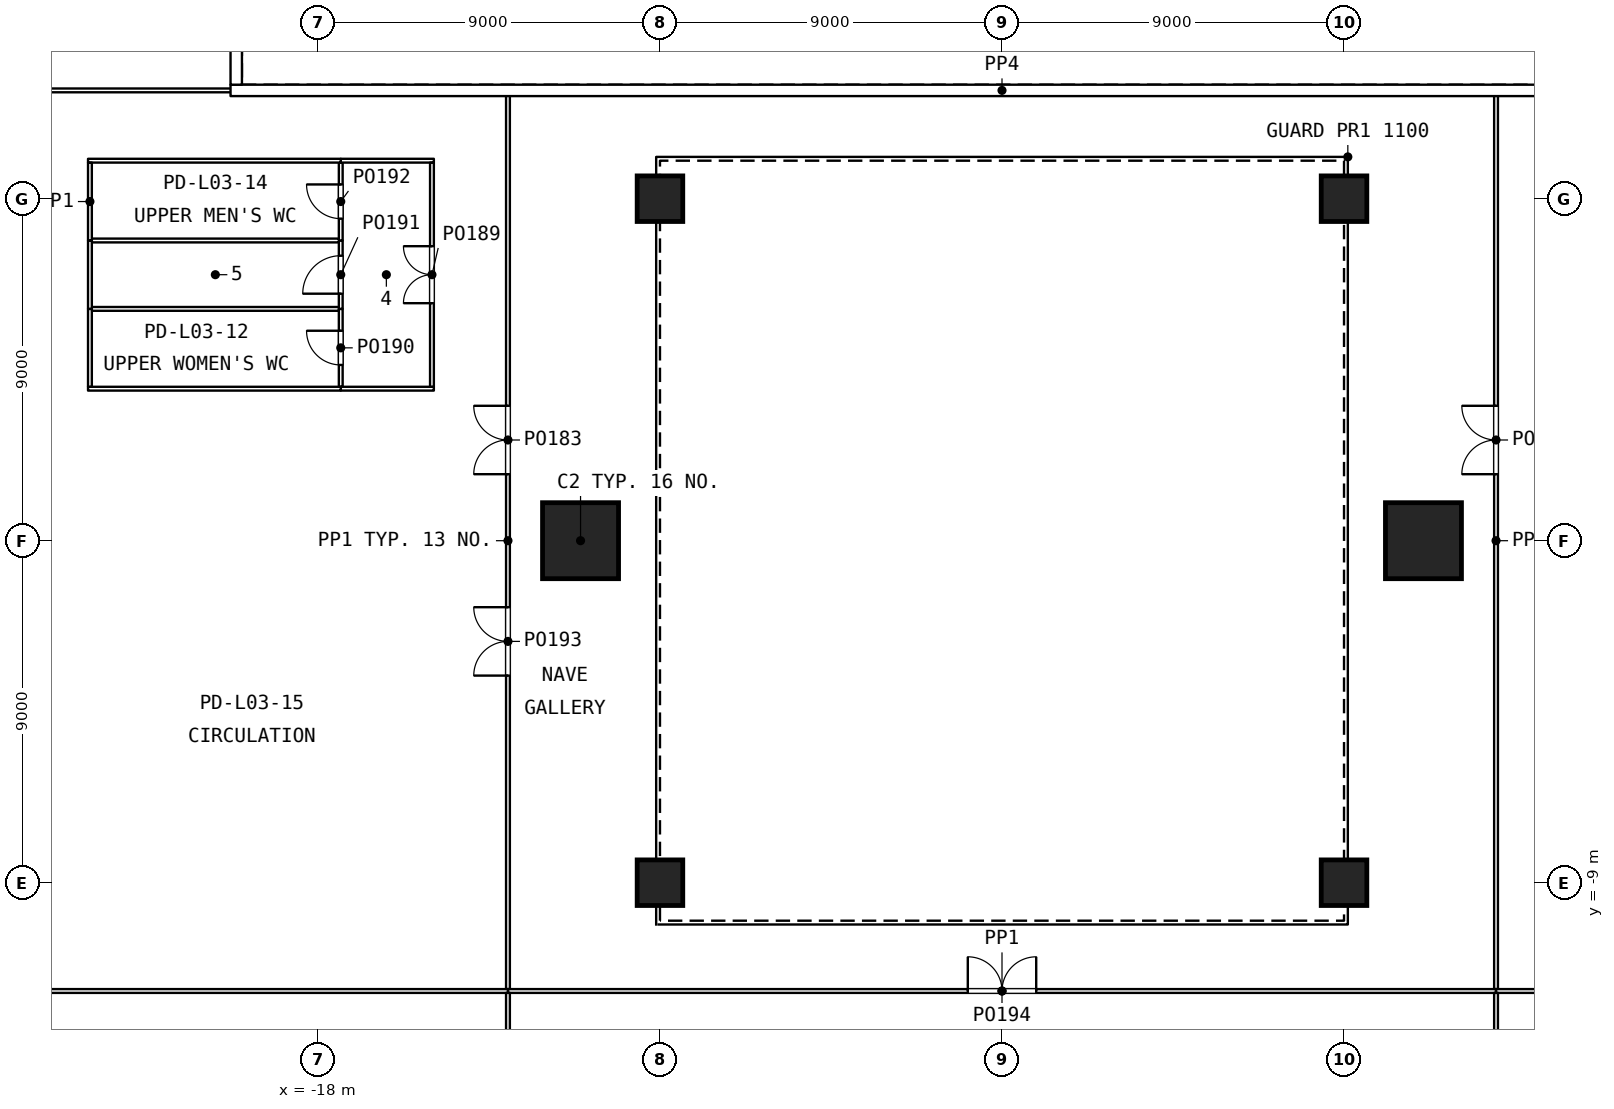
"""IFC4 building model, lengths in metres.
Left out: names, types, materials, properties, quantities, classifications, styles, units other than length and angle.
Written with IfcOpenShell. Run it as: python <this file> out.ifc"""

import sys

from ifc_helpers import new_model, si_unit, direction, frame, frame_2d, origin, origin_2d, place, context, subcontext, project, spatial, rectangle, extrude, element, fill, save


model = new_model("IFC4")
c1 = context("Model", 3, precision=1e-05, world=origin(), true_north=direction((0.0, 1.0)))
c2 = subcontext(c1, "Body", "Model", "MODEL_VIEW")
j1 = project(units=[si_unit("LENGTHUNIT", "METRE"), si_unit("PLANEANGLEUNIT", "RADIAN")], contexts=[c1])
p1 = place(None, origin())
s1 = spatial("IfcSite", under=j1, at=p1, CompositionType="ELEMENT")
p2 = place(p1, origin())
s2 = spatial("IfcBuilding", under=s1, at=p2, CompositionType="ELEMENT")
p3 = place(p2, frame((0.0, 0.0, 18.0)))
s3 = spatial("IfcBuildingStorey", under=s2, at=p3, CompositionType="ELEMENT", Elevation=18.0)
for number, where, z_axis, x_axis in (
    (1, (-9.0, -9.0, 0.0), (0.0, 0.0, 1.0), (1.0, 0.0, 0.0)),
    (2, (-9.0, 9.0, 0.0), (0.0, 0.0, 1.0), (1.0, 0.0, 0.0)),
    (3, (9.0, -9.0, 0.0), (0.0, 0.0, 1.0), (1.0, 0.0, 0.0)),
    (4, (9.0, 9.0, 0.0), (0.0, 0.0, 1.0), (1.0, 0.0, 0.0)),
):
    element("IfcColumn", number, at=place(p3, frame(where, z_axis=z_axis, x_axis=x_axis)), inside=s3, PredefinedType="COLUMN", context=c2, shape_type="SweptSolid", body=[
        extrude(rectangle(XDim=1.2, YDim=1.2, at=origin_2d()), origin(), (0.0, 0.0, 1.0), 4.8),
    ])
for number, where, z_axis, x_axis in (
    (5, (-11.09, 0.0, 0.0), (0.0, 0.0, 1.0), (1.0, 0.0, 0.0)),
    (6, (11.09, 0.0, 0.0), (0.0, 0.0, 1.0), (-1.0, 0.0, 0.0)),
):
    element("IfcColumn", number, at=place(p3, frame(where, z_axis=z_axis, x_axis=x_axis)), inside=s3, PredefinedType="COLUMN", context=c2, shape_type="SweptSolid", body=[
        extrude(rectangle(XDim=2.0, YDim=2.0, at=origin_2d()), origin(), (0.0, 0.0, 1.0), 4.8),
    ])
p4 = place(p3, frame((-56.2, 11.85, 0.0), z_axis=(0.0, 0.0, 1.0), x_axis=(1.0, 0.0, 0.0)))
e7 = element("IfcWall", 7, at=p4, inside=s3, PredefinedType="PARTITIONING", context=c2, shape_type="SweptSolid", body=[
    extrude(rectangle(XDim=36.1, YDim=0.1, at=frame_2d((18.05, 0.0))), origin(), (0.0, 0.0, 1.0), 4.5),
])
p5 = place(p4, frame((17.15, 0.0, 0.0)))
e8 = element("IfcOpeningElement", 8, at=p5, cuts=e7, PredefinedType="OPENING", context=c2, shape_type="SweptSolid", body=[
    extrude(rectangle(XDim=1.8, YDim=2.1, at=frame_2d((0.9, 1.05))), frame((0.0, 0.06, 0.0), z_axis=(0.0, -1.0, 0.0), x_axis=(1.0, 0.0, 0.0)), (0.0, 0.0, 1.0), 0.12),
])
p6 = place(p3, frame((-13.0, -11.8, 0.0), z_axis=(0.0, 0.0, 1.0), x_axis=(0.0, 1.0, 0.0)))
e9 = element("IfcWall", 9, at=p6, inside=s3, PredefinedType="PARTITIONING", context=c2, shape_type="SweptSolid", body=[
    extrude(rectangle(XDim=23.6, YDim=0.1, at=frame_2d((11.8, 0.0))), origin(), (0.0, 0.0, 1.0), 4.5),
])
p7 = place(p6, frame((13.55, 0.0, 0.0)))
e10 = element("IfcOpeningElement", 10, at=p7, cuts=e9, PredefinedType="OPENING", context=c2, shape_type="SweptSolid", body=[
    extrude(rectangle(XDim=1.8, YDim=2.1, at=frame_2d((0.9, 1.05))), frame((0.0, 0.06, 0.0), z_axis=(0.0, -1.0, 0.0), x_axis=(1.0, 0.0, 0.0)), (0.0, 0.0, 1.0), 0.12),
])
p8 = place(p6, frame((8.25, 0.0, 0.0)))
e11 = element("IfcOpeningElement", 11, at=p8, cuts=e9, PredefinedType="OPENING", context=c2, shape_type="SweptSolid", body=[
    extrude(rectangle(XDim=1.8, YDim=2.1, at=frame_2d((0.9, 1.05))), frame((0.0, 0.06, 0.0), z_axis=(0.0, -1.0, 0.0), x_axis=(1.0, 0.0, 0.0)), (0.0, 0.0, 1.0), 0.12),
])
p9 = place(p3, frame((13.0, -11.8, 0.0), z_axis=(0.0, 0.0, 1.0), x_axis=(0.0, 1.0, 0.0)))
e12 = element("IfcWall", 12, at=p9, inside=s3, PredefinedType="PARTITIONING", context=c2, shape_type="SweptSolid", body=[
    extrude(rectangle(XDim=23.6, YDim=0.1, at=frame_2d((11.8, 0.0))), origin(), (0.0, 0.0, 1.0), 4.5),
])
p10 = place(p9, frame((13.55, 0.0, 0.0)))
e13 = element("IfcOpeningElement", 13, at=p10, cuts=e12, PredefinedType="OPENING", context=c2, shape_type="SweptSolid", body=[
    extrude(rectangle(XDim=1.8, YDim=2.1, at=frame_2d((0.9, 1.05))), frame((0.0, 0.06, 0.0), z_axis=(0.0, -1.0, 0.0), x_axis=(1.0, 0.0, 0.0)), (0.0, 0.0, 1.0), 0.12),
])
p11 = place(p3, frame((-13.0, -11.85, 0.0), z_axis=(0.0, 0.0, 1.0), x_axis=(1.0, 0.0, 0.0)))
e14 = element("IfcWall", 14, at=p11, inside=s3, PredefinedType="PARTITIONING", context=c2, shape_type="SweptSolid", body=[
    extrude(rectangle(XDim=26.0, YDim=0.1, at=frame_2d((13.0, 0.0))), origin(), (0.0, 0.0, 1.0), 4.5),
])
p12 = place(p11, frame((12.1, 0.0, 0.0)))
e15 = element("IfcOpeningElement", 15, at=p12, cuts=e14, PredefinedType="OPENING", context=c2, shape_type="SweptSolid", body=[
    extrude(rectangle(XDim=1.8, YDim=2.1, at=frame_2d((0.9, 1.05))), frame((0.0, 0.06, 0.0), z_axis=(0.0, -1.0, 0.0), x_axis=(1.0, 0.0, 0.0)), (0.0, 0.0, 1.0), 0.12),
])
p13 = place(p3, frame((-64.6, -11.85, 0.0), z_axis=(0.0, 0.0, 1.0), x_axis=(1.0, 0.0, 0.0)))
e16 = element("IfcWall", 16, at=p13, inside=s3, PredefinedType="PARTITIONING", context=c2, shape_type="SweptSolid", body=[
    extrude(rectangle(XDim=51.6, YDim=0.1, at=frame_2d((25.8, 0.0))), origin(), (0.0, 0.0, 1.0), 4.5),
])
p14 = place(p13, frame((25.3, 0.0, 0.0)))
e17 = element("IfcOpeningElement", 17, at=p14, cuts=e16, PredefinedType="OPENING", context=c2, shape_type="SweptSolid", body=[
    extrude(rectangle(XDim=1.0, YDim=2.1, at=frame_2d((0.5, 1.05))), frame((0.0, 0.06, 0.0), z_axis=(0.0, -1.0, 0.0), x_axis=(1.0, 0.0, 0.0)), (0.0, 0.0, 1.0), 0.12),
])
p15 = place(p3, frame((-13.0, -28.1, 0.0), z_axis=(0.0, 0.0, 1.0), x_axis=(0.0, 1.0, 0.0)))
e18 = element("IfcWall", 18, at=p15, inside=s3, PredefinedType="PARTITIONING", context=c2, shape_type="SweptSolid", body=[
    extrude(rectangle(XDim=16.2, YDim=0.1, at=frame_2d((8.1, 0.0))), origin(), (0.0, 0.0, 1.0), 4.5),
])
p16 = place(p3, frame((13.0, -11.85, 0.0), z_axis=(0.0, 0.0, 1.0), x_axis=(1.0, 0.0, 0.0)))
e19 = element("IfcWall", 19, at=p16, inside=s3, PredefinedType="PARTITIONING", context=c2, shape_type="SweptSolid", body=[
    extrude(rectangle(XDim=21.415, YDim=0.1, at=frame_2d((10.708, 0.0))), origin(), (0.0, 0.0, 1.0), 4.5),
])
p17 = place(p3, frame((13.0, -28.1, 0.0), z_axis=(0.0, 0.0, 1.0), x_axis=(0.0, 1.0, 0.0)))
e20 = element("IfcWall", 20, at=p17, inside=s3, PredefinedType="PARTITIONING", context=c2, shape_type="SweptSolid", body=[
    extrude(rectangle(XDim=16.2, YDim=0.1, at=frame_2d((8.1, 0.0))), origin(), (0.0, 0.0, 1.0), 4.5),
])
p18 = place(p3, frame((-17.4, 4.05, 0.0), z_axis=(0.0, 0.0, 1.0), x_axis=(0.0, 1.0, 0.0)))
e21 = element("IfcWall", 21, at=p18, inside=s3, PredefinedType="PARTITIONING", context=c2, shape_type="SweptSolid", body=[
    extrude(rectangle(XDim=2.05, YDim=0.1, at=frame_2d((1.025, 0.0))), origin(), (0.0, 0.0, 1.0), 4.5),
])
p19 = place(p18, frame((0.575, 0.0, 0.0)))
e22 = element("IfcOpeningElement", 22, at=p19, cuts=e21, PredefinedType="OPENING", context=c2, shape_type="SweptSolid", body=[
    extrude(rectangle(XDim=0.9, YDim=2.1, at=frame_2d((0.45, 1.05))), frame((0.0, 0.06, 0.0), z_axis=(0.0, -1.0, 0.0), x_axis=(1.0, 0.0, 0.0)), (0.0, 0.0, 1.0), 0.12),
])
p20 = place(p3, frame((-17.4, 6.1, 0.0), z_axis=(0.0, 0.0, 1.0), x_axis=(0.0, 1.0, 0.0)))
e23 = element("IfcWall", 23, at=p20, inside=s3, PredefinedType="PARTITIONING", context=c2, shape_type="SweptSolid", body=[
    extrude(rectangle(XDim=1.8, YDim=0.1, at=frame_2d((0.9, 0.0))), origin(), (0.0, 0.0, 1.0), 4.5),
])
p21 = place(p20, frame((0.4, 0.0, 0.0)))
e24 = element("IfcOpeningElement", 24, at=p21, cuts=e23, PredefinedType="OPENING", context=c2, shape_type="SweptSolid", body=[
    extrude(rectangle(XDim=1.0, YDim=2.1, at=frame_2d((0.5, 1.05))), frame((0.0, 0.06, 0.0), z_axis=(0.0, -1.0, 0.0), x_axis=(1.0, 0.0, 0.0)), (0.0, 0.0, 1.0), 0.12),
])
p22 = place(p3, frame((-17.4, 7.9, 0.0), z_axis=(0.0, 0.0, 1.0), x_axis=(0.0, 1.0, 0.0)))
e25 = element("IfcWall", 25, at=p22, inside=s3, PredefinedType="PARTITIONING", context=c2, shape_type="SweptSolid", body=[
    extrude(rectangle(XDim=2.05, YDim=0.1, at=frame_2d((1.025, 0.0))), origin(), (0.0, 0.0, 1.0), 4.5),
])
p23 = place(p22, frame((0.575, 0.0, 0.0)))
e26 = element("IfcOpeningElement", 26, at=p23, cuts=e25, PredefinedType="OPENING", context=c2, shape_type="SweptSolid", body=[
    extrude(rectangle(XDim=0.9, YDim=2.1, at=frame_2d((0.45, 1.05))), frame((0.0, 0.06, 0.0), z_axis=(0.0, -1.0, 0.0), x_axis=(1.0, 0.0, 0.0)), (0.0, 0.0, 1.0), 0.12),
])
for number, where, z_axis, x_axis in (
    (27, (-17.4, 4.0, 0.0), (0.0, 0.0, 1.0), (1.0, 0.0, 0.0)),
    (28, (-17.4, 10.0, 0.0), (0.0, 0.0, 1.0), (1.0, 0.0, 0.0)),
):
    element("IfcWall", number, at=place(p3, frame(where, z_axis=z_axis, x_axis=x_axis)), inside=s3, PredefinedType="PARTITIONING", context=c2, shape_type="SweptSolid", body=[
        extrude(rectangle(XDim=2.45, YDim=0.1, at=frame_2d((1.225, 0.0))), origin(), (0.0, 0.0, 1.0), 4.5),
    ])
p24 = place(p3, frame((-15.0, 4.05, 0.0), z_axis=(0.0, 0.0, 1.0), x_axis=(0.0, 1.0, 0.0)))
e29 = element("IfcWall", 29, at=p24, inside=s3, PredefinedType="PARTITIONING", context=c2, shape_type="SweptSolid", body=[
    extrude(rectangle(XDim=5.9, YDim=0.1, at=frame_2d((2.95, 0.0))), origin(), (0.0, 0.0, 1.0), 4.5),
])
p25 = place(p24, frame((2.2, 0.0, 0.0)))
e30 = element("IfcOpeningElement", 30, at=p25, cuts=e29, PredefinedType="OPENING", context=c2, shape_type="SweptSolid", body=[
    extrude(rectangle(XDim=1.5, YDim=2.1, at=frame_2d((0.75, 1.05))), frame((0.0, 0.06, 0.0), z_axis=(0.0, -1.0, 0.0), x_axis=(1.0, 0.0, 0.0)), (0.0, 0.0, 1.0), 0.12),
])
p26 = place(p3, frame((-23.95, 6.1, 0.0), z_axis=(0.0, 0.0, 1.0), x_axis=(1.0, 0.0, 0.0)))
e31 = element("IfcWall", 31, at=p26, inside=s3, PredefinedType="PARTITIONING", context=c2, shape_type="SweptSolid", body=[
    extrude(rectangle(XDim=6.5, YDim=0.1, at=frame_2d((3.25, 0.0))), origin(), (0.0, 0.0, 1.0), 4.5),
])
p27 = place(p3, frame((-24.05, 4.0, 0.0), z_axis=(0.0, 0.0, 1.0), x_axis=(1.0, 0.0, 0.0)))
e32 = element("IfcWall", 32, at=p27, inside=s3, PredefinedType="PARTITIONING", context=c2, shape_type="SweptSolid", body=[
    extrude(rectangle(XDim=6.65, YDim=0.1, at=frame_2d((3.325, 0.0))), origin(), (0.0, 0.0, 1.0), 4.5),
])
p28 = place(p3, frame((-24.0, 4.05, 0.0), z_axis=(0.0, 0.0, 1.0), x_axis=(0.0, 1.0, 0.0)))
e33 = element("IfcWall", 33, at=p28, inside=s3, PredefinedType="PARTITIONING", context=c2, shape_type="SweptSolid", body=[
    extrude(rectangle(XDim=2.05, YDim=0.1, at=frame_2d((1.025, 0.0))), origin(), (0.0, 0.0, 1.0), 4.5),
])
p29 = place(p3, frame((-23.95, 7.9, 0.0), z_axis=(0.0, 0.0, 1.0), x_axis=(1.0, 0.0, 0.0)))
e34 = element("IfcWall", 34, at=p29, inside=s3, PredefinedType="PARTITIONING", context=c2, shape_type="SweptSolid", body=[
    extrude(rectangle(XDim=6.5, YDim=0.1, at=frame_2d((3.25, 0.0))), origin(), (0.0, 0.0, 1.0), 4.5),
])
p30 = place(p3, frame((-24.0, 6.1, 0.0), z_axis=(0.0, 0.0, 1.0), x_axis=(0.0, 1.0, 0.0)))
e35 = element("IfcWall", 35, at=p30, inside=s3, PredefinedType="PARTITIONING", context=c2, shape_type="SweptSolid", body=[
    extrude(rectangle(XDim=1.8, YDim=0.1, at=frame_2d((0.9, 0.0))), origin(), (0.0, 0.0, 1.0), 4.5),
])
p31 = place(p3, frame((-24.05, 10.0, 0.0), z_axis=(0.0, 0.0, 1.0), x_axis=(1.0, 0.0, 0.0)))
e36 = element("IfcWall", 36, at=p31, inside=s3, PredefinedType="PARTITIONING", context=c2, shape_type="SweptSolid", body=[
    extrude(rectangle(XDim=6.65, YDim=0.1, at=frame_2d((3.325, 0.0))), origin(), (0.0, 0.0, 1.0), 4.5),
])
p32 = place(p3, frame((-24.0, 7.9, 0.0), z_axis=(0.0, 0.0, 1.0), x_axis=(0.0, 1.0, 0.0)))
e37 = element("IfcWall", 37, at=p32, inside=s3, PredefinedType="PARTITIONING", context=c2, shape_type="SweptSolid", body=[
    extrude(rectangle(XDim=2.05, YDim=0.1, at=frame_2d((1.025, 0.0))), origin(), (0.0, 0.0, 1.0), 4.5),
])
p33 = place(p3, frame((-20.3, 11.85, 0.0), z_axis=(0.0, 0.0, 1.0), x_axis=(1.0, 0.0, 0.0)))
e38 = element("IfcWall", 38, at=p33, inside=s3, PredefinedType="PARTITIONING", context=c2, shape_type="SweptSolid", body=[
    extrude(rectangle(XDim=40.6, YDim=0.3, at=frame_2d((20.3, 0.0))), origin(), (0.0, 0.0, 1.0), 4.5),
])
p34 = place(p3, frame((-20.15, 12.0, 0.0), z_axis=(0.0, 0.0, 1.0), x_axis=(0.0, 1.0, 0.0)))
e39 = element("IfcWall", 39, at=p34, inside=s3, PredefinedType="PARTITIONING", context=c2, shape_type="SweptSolid", body=[
    extrude(rectangle(XDim=14.5, YDim=0.3, at=frame_2d((7.25, 0.0))), origin(), (0.0, 0.0, 1.0), 4.5),
])
p35 = place(p7, origin())
e40 = element("IfcDoor", 40, at=p35, inside=s3, OperationType="DOUBLE_DOOR_DOUBLE_SWING", PredefinedType="DOOR", context=c2, shape_type="SweptSolid", body=[
    extrude(rectangle(XDim=1.8, YDim=2.1, at=frame_2d((0.9, 1.05))), frame((0.0, 0.025, 0.0), z_axis=(0.0, -1.0, 0.0), x_axis=(1.0, 0.0, 0.0)), (0.0, 0.0, 1.0), 0.05),
])
fill(e10, e40)
p36 = place(p10, origin())
e41 = element("IfcDoor", 41, at=p36, inside=s3, OperationType="DOUBLE_DOOR_DOUBLE_SWING", PredefinedType="DOOR", context=c2, shape_type="SweptSolid", body=[
    extrude(rectangle(XDim=1.8, YDim=2.1, at=frame_2d((0.9, 1.05))), frame((0.0, 0.025, 0.0), z_axis=(0.0, -1.0, 0.0), x_axis=(1.0, 0.0, 0.0)), (0.0, 0.0, 1.0), 0.05),
])
fill(e13, e41)
p37 = place(p25, origin())
e42 = element("IfcDoor", 42, at=p37, inside=s3, OperationType="DOUBLE_DOOR_DOUBLE_SWING", PredefinedType="DOOR", context=c2, shape_type="SweptSolid", body=[
    extrude(rectangle(XDim=1.5, YDim=2.1, at=frame_2d((0.75, 1.05))), frame((0.0, 0.025, 0.0), z_axis=(0.0, -1.0, 0.0), x_axis=(1.0, 0.0, 0.0)), (0.0, 0.0, 1.0), 0.05),
])
fill(e30, e42)
p38 = place(p19, origin())
e43 = element("IfcDoor", 43, at=p38, inside=s3, OperationType="SINGLE_SWING_RIGHT", PredefinedType="DOOR", context=c2, shape_type="SweptSolid", body=[
    extrude(rectangle(XDim=0.9, YDim=2.1, at=frame_2d((0.45, 1.05))), frame((0.0, 0.025, 0.0), z_axis=(0.0, -1.0, 0.0), x_axis=(1.0, 0.0, 0.0)), (0.0, 0.0, 1.0), 0.05),
])
fill(e22, e43)
p39 = place(p21, origin())
e44 = element("IfcDoor", 44, at=p39, inside=s3, OperationType="SINGLE_SWING_LEFT", PredefinedType="DOOR", context=c2, shape_type="SweptSolid", body=[
    extrude(rectangle(XDim=1.0, YDim=2.1, at=frame_2d((0.5, 1.05))), frame((0.0, 0.025, 0.0), z_axis=(0.0, -1.0, 0.0), x_axis=(1.0, 0.0, 0.0)), (0.0, 0.0, 1.0), 0.05),
])
fill(e24, e44)
p40 = place(p23, origin())
e45 = element("IfcDoor", 45, at=p40, inside=s3, OperationType="SINGLE_SWING_RIGHT", PredefinedType="DOOR", context=c2, shape_type="SweptSolid", body=[
    extrude(rectangle(XDim=0.9, YDim=2.1, at=frame_2d((0.45, 1.05))), frame((0.0, 0.025, 0.0), z_axis=(0.0, -1.0, 0.0), x_axis=(1.0, 0.0, 0.0)), (0.0, 0.0, 1.0), 0.05),
])
fill(e26, e45)
p41 = place(p8, origin())
e46 = element("IfcDoor", 46, at=p41, inside=s3, OperationType="DOUBLE_DOOR_DOUBLE_SWING", PredefinedType="DOOR", context=c2, shape_type="SweptSolid", body=[
    extrude(rectangle(XDim=1.8, YDim=2.1, at=frame_2d((0.9, 1.05))), frame((0.0, 0.025, 0.0), z_axis=(0.0, -1.0, 0.0), x_axis=(1.0, 0.0, 0.0)), (0.0, 0.0, 1.0), 0.05),
])
fill(e11, e46)
p42 = place(p12, origin())
e47 = element("IfcDoor", 47, at=p42, inside=s3, OperationType="DOUBLE_DOOR_DOUBLE_SWING", PredefinedType="DOOR", context=c2, shape_type="SweptSolid", body=[
    extrude(rectangle(XDim=1.8, YDim=2.1, at=frame_2d((0.9, 1.05))), frame((0.0, 0.025, 0.0), z_axis=(0.0, -1.0, 0.0), x_axis=(1.0, 0.0, 0.0)), (0.0, 0.0, 1.0), 0.05),
])
fill(e15, e47)
save(model, sys.argv[1])
